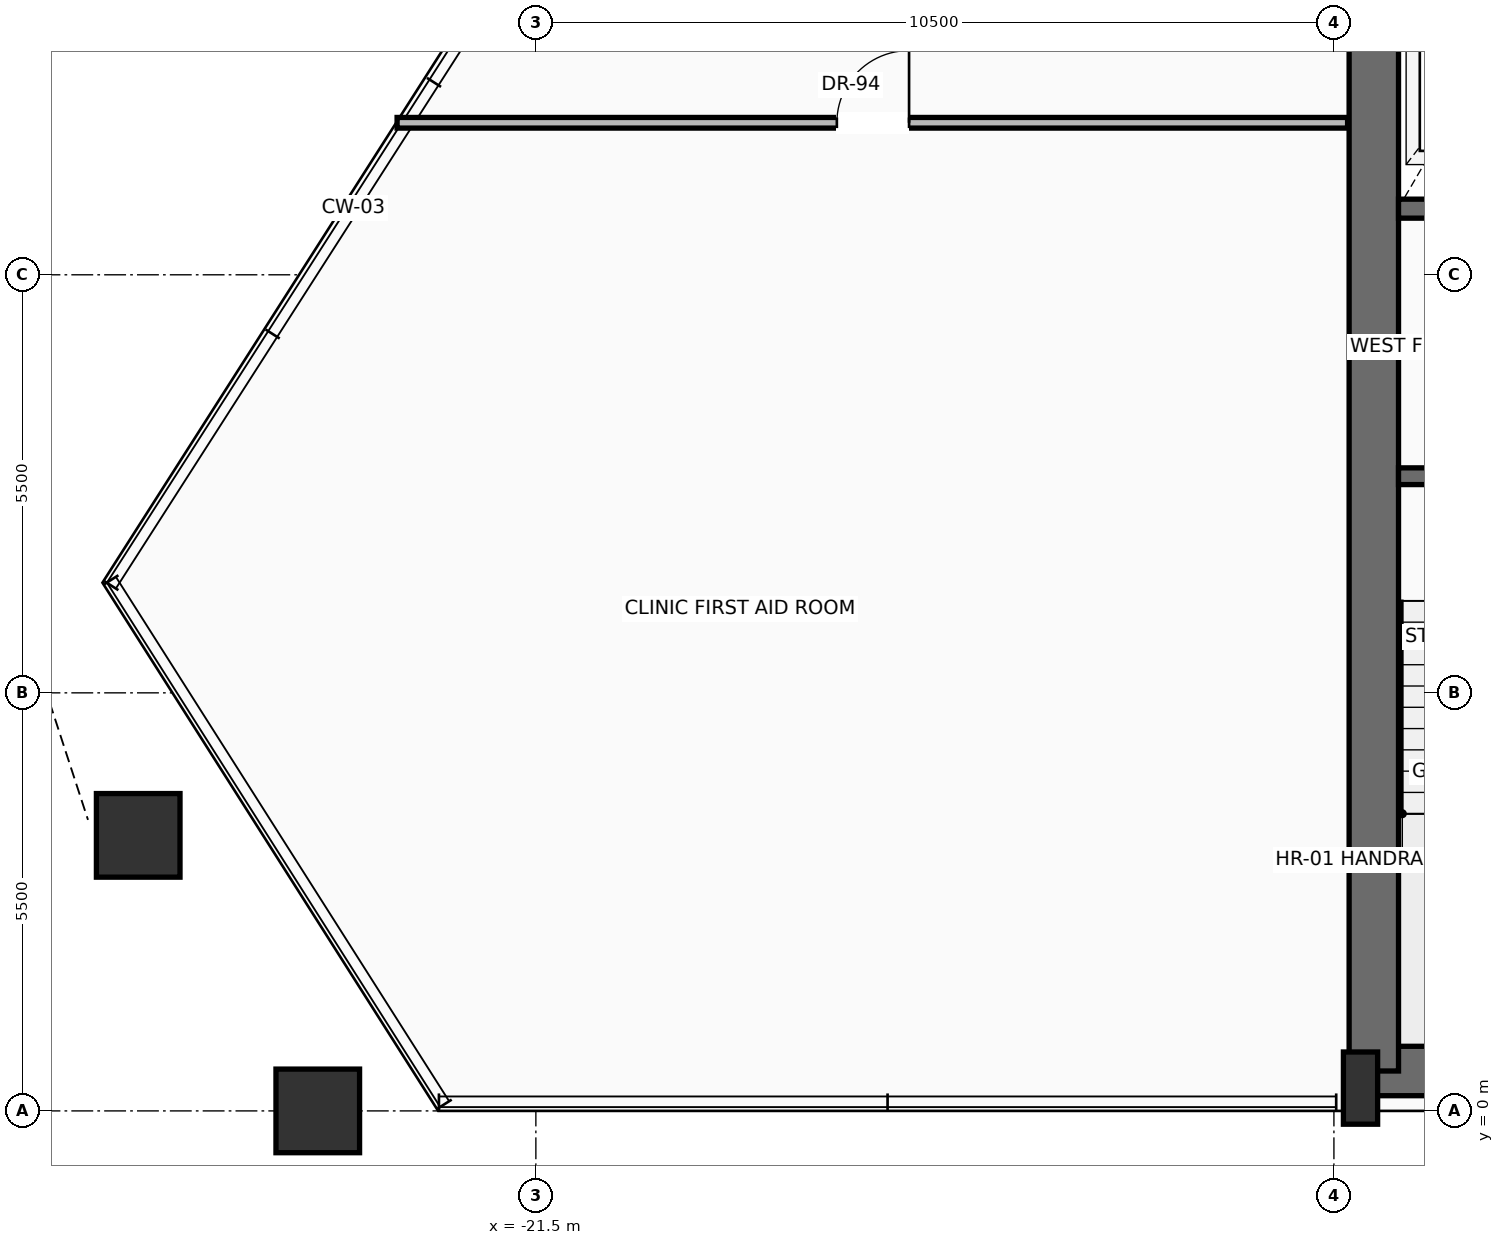
"""IFC4 building model, lengths in metres.
Left out: names, types, materials, properties, quantities, classifications, styles, units other than length and angle.
Written with IfcOpenShell. Run it as: python <this file> out.ifc"""

import sys

from ifc_helpers import new_model, si_unit, direction, frame, frame_2d, origin, origin_2d, place, context, subcontext, project, spatial, rectangle, hollow_rectangle, extrude, source, transform, mapped, element, fill, save


model = new_model("IFC4")
c1 = context("Model", 3, precision=1e-05, world=origin(), true_north=direction((0.0, 1.0)))
c2 = subcontext(c1, "Body", "Model", "MODEL_VIEW")
j1 = project(units=[si_unit("LENGTHUNIT", "METRE"), si_unit("PLANEANGLEUNIT", "RADIAN")], contexts=[c1])
p1 = place(None, origin())
s1 = spatial("IfcSite", under=j1, at=p1, CompositionType="ELEMENT")
p2 = place(p1, origin())
s2 = spatial("IfcBuilding", under=s1, at=p2, CompositionType="ELEMENT")
p3 = place(p2, frame((0.0, 0.0, 158.9)))
s3 = spatial("IfcBuildingStorey", under=s2, at=p3, CompositionType="ELEMENT", Elevation=158.9)
p4 = place(p3, frame((-10.65, 0.525, 0.0), z_axis=(0.0, 0.0, 1.0), x_axis=(1.0, 0.0, 0.0)))
e1 = element("IfcWall", 1, at=p4, inside=s3, PredefinedType="SHEAR", context=c2, shape_type="SweptSolid", body=[
    extrude(rectangle(XDim=21.3, YDim=0.65, at=frame_2d((10.65, 0.0))), origin(), (0.0, 0.0, 1.0), 3.47),
])
p5 = place(p3, frame((-10.475, 0.525, 0.0), z_axis=(0.0, 0.0, 1.0), x_axis=(0.0, 1.0, 0.0)))
e2 = element("IfcWall", 2, at=p5, inside=s3, PredefinedType="SHEAR", context=c2, shape_type="SweptSolid", body=[
    extrude(rectangle(XDim=15.55, YDim=0.65, at=frame_2d((7.775, 0.0))), origin(), (0.0, 0.0, 1.0), 3.47),
])
m1 = source(origin(), c2, "Body", "SweptSolid", [
    extrude(rectangle(XDim=0.45, YDim=0.95, at=origin_2d()), origin(), (0.0, 0.0, 1.0), 3.7),
])
p6 = place(p3, frame((-10.65, 0.3, 0.0), z_axis=(0.0, 0.0, 1.0), x_axis=(1.0, 0.0, 0.0)))
e3 = element("IfcColumn", 3, at=p6, inside=s3, PredefinedType="PILASTER", context=c2, shape_type="MappedRepresentation", body=[
    mapped(m1, transform((0.0, 0.0, 0.0), scale=1.0)),
])
m2 = source(origin(), c2, "Body", "SweptSolid", [
    extrude(hollow_rectangle(XDim=1.1, YDim=1.1, WallThickness=0.055, at=origin_2d()), origin(), (0.0, 0.0, 1.0), 3.692),
])
p7 = place(p3, frame((-24.369, 0.0, 0.004), z_axis=(-0.009391120248, 0.0, 0.999955902458), x_axis=(0.0, -1.0, 0.0)))
e4 = element("IfcColumn", 4, at=p7, inside=s3, PredefinedType="COLUMN", context=c2, shape_type="MappedRepresentation", body=[
    mapped(m2, transform((0.0, 0.0, 0.0), scale=1.0)),
])
m3 = source(origin(), c2, "Body", "SweptSolid", [
    extrude(hollow_rectangle(XDim=1.1, YDim=1.1, WallThickness=0.055, at=origin_2d()), origin(), (0.0, 0.0, 1.0), 3.692),
])
p8 = place(p3, frame((-26.732, 3.625, 0.004), z_axis=(0.001256454491, -0.015871004099, 0.999873258244), x_axis=(0.996880972863, 0.078919743685, 0.0)))
e5 = element("IfcColumn", 5, at=p8, inside=s3, PredefinedType="COLUMN", context=c2, shape_type="MappedRepresentation", body=[
    mapped(m3, transform((0.0, 0.0, 0.0), scale=1.0)),
])
p9 = place(p3, frame((-5.5, 8.35, 0.0), z_axis=(0.0, 0.0, 1.0), x_axis=(-1.0, 0.0, 0.0)))
e6 = element("IfcWall", 6, at=p9, inside=s3, PredefinedType="SOLIDWALL", context=c2, shape_type="SweptSolid", body=[
    extrude(rectangle(XDim=4.65, YDim=0.22, at=frame_2d((2.325, 0.0))), origin(), (0.0, 0.0, 1.0), 3.47),
])
p10 = place(p9, frame((2.5, 0.0, 0.0)))
e7 = element("IfcOpeningElement", 7, at=p10, cuts=e6, PredefinedType="OPENING", context=c2, shape_type="SweptSolid", body=[
    extrude(rectangle(XDim=1.15, YDim=2.2, at=frame_2d((0.575, 1.1))), frame((0.0, 0.12, 0.0), z_axis=(0.0, -1.0, 0.0), x_axis=(1.0, 0.0, 0.0)), (0.0, 0.0, 1.0), 0.24),
])
p11 = place(p3, frame((-5.5, 11.87, 0.0), z_axis=(0.0, 0.0, 1.0), x_axis=(-1.0, 0.0, 0.0)))
e8 = element("IfcWall", 8, at=p11, inside=s3, PredefinedType="SOLIDWALL", context=c2, shape_type="SweptSolid", body=[
    extrude(rectangle(XDim=4.65, YDim=0.25, at=frame_2d((2.325, 0.0))), origin(), (0.0, 0.0, 1.0), 3.47),
])
p12 = place(p11, frame((2.95, 0.0, 0.0)))
e9 = element("IfcOpeningElement", 9, at=p12, cuts=e8, PredefinedType="OPENING", context=c2, shape_type="SweptSolid", body=[
    extrude(rectangle(XDim=1.2, YDim=2.25, at=frame_2d((0.6, 1.125))), frame((0.0, 0.135, 0.0), z_axis=(0.0, -1.0, 0.0), x_axis=(1.0, 0.0, 0.0)), (0.0, 0.0, 1.0), 0.27),
])
p13 = place(p3, frame((-23.326, 13.0, 0.0), z_axis=(0.0, 0.0, 1.0), x_axis=(1.0, 0.0, 0.0)))
e10 = element("IfcWall", 10, at=p13, inside=s3, PredefinedType="PARTITIONING", context=c2, shape_type="SweptSolid", body=[
    extrude(rectangle(XDim=12.506, YDim=0.14, at=frame_2d((6.253, 0.0))), origin(), (0.0, 0.0, 1.0), 3.462),
])
p14 = place(p13, frame((5.786, 0.0, 0.0)))
e11 = element("IfcOpeningElement", 11, at=p14, cuts=e10, PredefinedType="OPENING", context=c2, shape_type="SweptSolid", body=[
    extrude(rectangle(XDim=0.95, YDim=2.2, at=frame_2d((0.475, 1.1))), frame((0.0, 0.08, 0.0), z_axis=(0.0, -1.0, 0.0), x_axis=(1.0, 0.0, 0.0)), (0.0, 0.0, 1.0), 0.16),
])
m4 = source(origin(), c2, "Body", "SweptSolid", [
    extrude(rectangle(XDim=0.95, YDim=2.2, at=frame_2d((0.475, 1.1))), frame((0.0, 0.025, 0.0), z_axis=(0.0, -1.0, 0.0), x_axis=(1.0, 0.0, 0.0)), (0.0, 0.0, 1.0), 0.05),
])
p15 = place(p14, origin())
e12 = element("IfcDoor", 12, at=p15, inside=s3, OperationType="SINGLE_SWING_RIGHT", PredefinedType="DOOR", context=c2, shape_type="MappedRepresentation", body=[
    mapped(m4, transform((0.0, 0.0, 0.0), scale=1.0)),
])
fill(e11, e12)
save(model, sys.argv[1])
